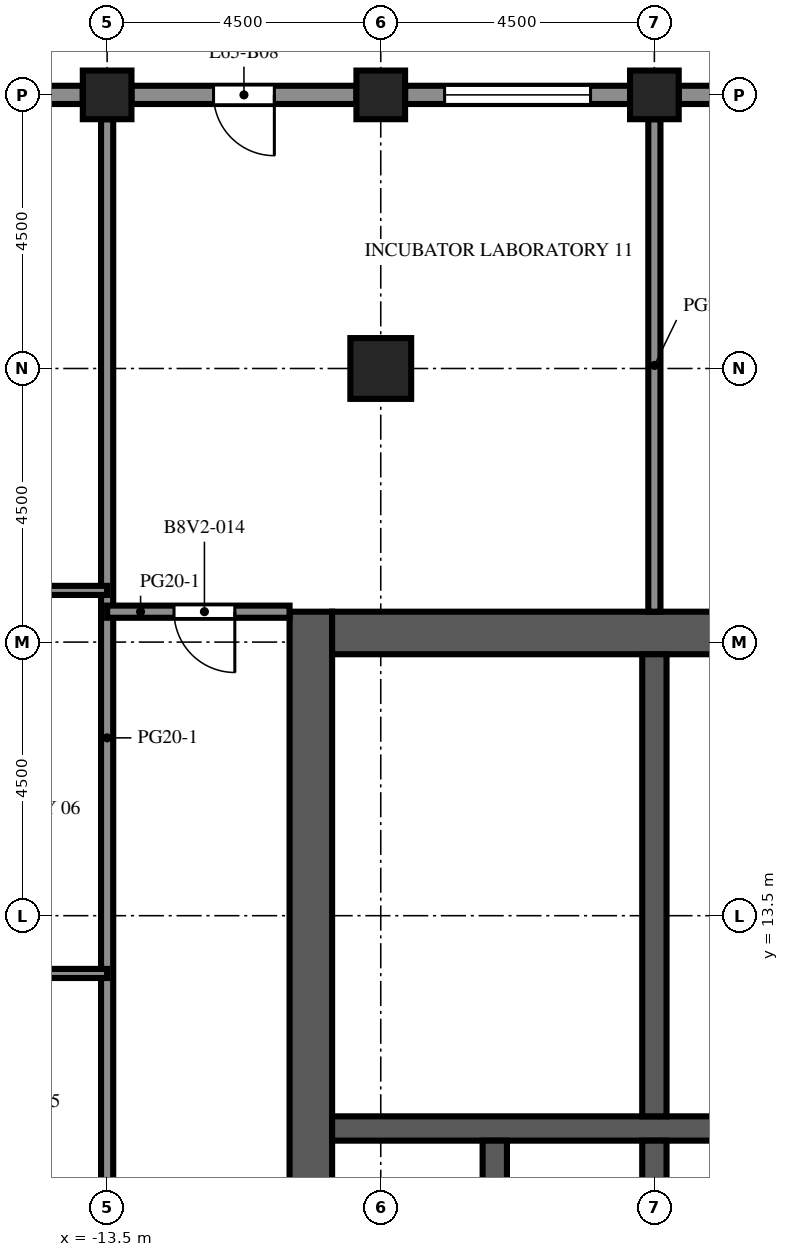
"""IFC4 building model, lengths in metres.
Left out: names, types, materials, properties, quantities, classifications, styles, units other than length and angle.
Written with IfcOpenShell. Run it as: python <this file> out.ifc"""

import sys

from ifc_helpers import new_model, si_unit, direction, frame, frame_2d, origin, origin_2d, place, context, subcontext, project, spatial, rectangle, extrude, element, fill, save


model = new_model("IFC4")
c1 = context("Model", 3, precision=1e-05, world=origin(), true_north=direction((0.0, 1.0)))
c2 = subcontext(c1, "Body", "Model", "MODEL_VIEW")
j1 = project(units=[si_unit("LENGTHUNIT", "METRE"), si_unit("PLANEANGLEUNIT", "RADIAN")], contexts=[c1])
p1 = place(None, origin())
s1 = spatial("IfcSite", under=j1, at=p1, CompositionType="ELEMENT")
p2 = place(p1, origin())
s2 = spatial("IfcBuilding", under=s1, at=p2, CompositionType="ELEMENT")
p3 = place(p2, frame((0.0, 0.0, 286.8)))
s3 = spatial("IfcBuildingStorey", under=s2, at=p3, CompositionType="ELEMENT", Elevation=286.8)
for number, where, z_axis, x_axis in (
    (1, (-13.5, 27.0, 0.0), (0.0, 0.0, 1.0), (1.0, 0.0, 0.0)),
    (2, (-9.0, 27.0, 0.0), (0.0, 0.0, 1.0), (1.0, 0.0, 0.0)),
    (3, (-4.5, 27.0, 0.0), (0.0, 0.0, 1.0), (1.0, 0.0, 0.0)),
):
    element("IfcColumn", number, at=place(p3, frame(where, z_axis=z_axis, x_axis=x_axis)), inside=s3, PredefinedType="COLUMN", context=c2, shape_type="SweptSolid", body=[
        extrude(rectangle(XDim=0.8, YDim=0.8, at=origin_2d()), origin(), (0.0, 0.0, 1.0), 4.1),
    ])
p4 = place(p3, frame((-9.0, 22.5, 0.0), z_axis=(0.0, 0.0, 1.0), x_axis=(1.0, 0.0, 0.0)))
e4 = element("IfcColumn", 4, at=p4, inside=s3, PredefinedType="COLUMN", context=c2, shape_type="SweptSolid", body=[
    extrude(rectangle(XDim=1.0, YDim=1.0, at=origin_2d()), origin(), (0.0, 0.0, 1.0), 4.1),
])
p5 = place(p3, frame((-10.15, -9.0, 0.0), z_axis=(0.0, 0.0, 1.0), x_axis=(0.0, 1.0, 0.0)))
e5 = element("IfcWall", 5, at=p5, inside=s3, PredefinedType="SHEAR", context=c2, shape_type="SweptSolid", body=[
    extrude(rectangle(XDim=27.5, YDim=0.7, at=frame_2d((13.75, 0.0))), origin(), (0.0, 0.0, 1.0), 4.1),
])
p6 = place(p5, frame((12.55, 0.0, 0.0)))
e6 = element("IfcOpeningElement", 6, at=p6, cuts=e5, PredefinedType="OPENING", context=c2, shape_type="SweptSolid", body=[
    extrude(rectangle(XDim=2.4, YDim=2.4, at=frame_2d((1.2, 1.2))), frame((0.0, 0.36, 0.0), z_axis=(0.0, -1.0, 0.0), x_axis=(1.0, 0.0, 0.0)), (0.0, 0.0, 1.0), 0.72),
])
p7 = place(p5, frame((6.825, 0.0, 0.0)))
e7 = element("IfcOpeningElement", 7, at=p7, cuts=e5, PredefinedType="OPENING", context=c2, shape_type="SweptSolid", body=[
    extrude(rectangle(XDim=1.2, YDim=2.1, at=frame_2d((0.6, 1.05))), frame((0.0, 0.36, 0.0), z_axis=(0.0, -1.0, 0.0), x_axis=(1.0, 0.0, 0.0)), (0.0, 0.0, 1.0), 0.72),
])
p8 = place(p5, frame((19.475, 0.0, 0.0)))
e8 = element("IfcOpeningElement", 8, at=p8, cuts=e5, PredefinedType="OPENING", context=c2, shape_type="SweptSolid", body=[
    extrude(rectangle(XDim=1.2, YDim=2.1, at=frame_2d((0.6, 1.05))), frame((0.0, 0.36, 0.0), z_axis=(0.0, -1.0, 0.0), x_axis=(1.0, 0.0, 0.0)), (0.0, 0.0, 1.0), 0.72),
])
p9 = place(p3, frame((-9.8, 18.15, 0.0), z_axis=(0.0, 0.0, 1.0), x_axis=(1.0, 0.0, 0.0)))
e9 = element("IfcWall", 9, at=p9, inside=s3, PredefinedType="SHEAR", context=c2, shape_type="SweptSolid", body=[
    extrude(rectangle(XDim=10.6, YDim=0.7, at=frame_2d((5.3, 0.0))), origin(), (0.0, 0.0, 1.0), 4.1),
])
p10 = place(p3, frame((-9.8, 10.0, 0.0), z_axis=(0.0, 0.0, 1.0), x_axis=(1.0, 0.0, 0.0)))
e10 = element("IfcWall", 10, at=p10, inside=s3, PredefinedType="SHEAR", context=c2, shape_type="SweptSolid", body=[
    extrude(rectangle(XDim=10.6, YDim=0.4, at=frame_2d((5.3, 0.0))), origin(), (0.0, 0.0, 1.0), 4.1),
])
for number, where, z_axis, x_axis in (
    (11, (-7.125, 6.9, 0.0), (0.0, 0.0, 1.0), (0.0, 1.0, 0.0)),
    (12, (-4.5, 6.9, 0.0), (0.0, 0.0, 1.0), (0.0, 1.0, 0.0)),
):
    element("IfcWall", number, at=place(p3, frame(where, z_axis=z_axis, x_axis=x_axis)), inside=s3, PredefinedType="SHEAR", context=c2, shape_type="SweptSolid", body=[
        extrude(rectangle(XDim=2.9, YDim=0.4, at=frame_2d((1.45, 0.0))), origin(), (0.0, 0.0, 1.0), 4.1),
    ])
p11 = place(p3, frame((-4.5, 10.2, 0.0), z_axis=(0.0, 0.0, 1.0), x_axis=(0.0, 1.0, 0.0)))
e13 = element("IfcWall", 13, at=p11, inside=s3, PredefinedType="SHEAR", context=c2, shape_type="SweptSolid", body=[
    extrude(rectangle(XDim=7.6, YDim=0.4, at=frame_2d((3.8, 0.0))), origin(), (0.0, 0.0, 1.0), 4.1),
])
p12 = place(p3, frame((-4.1, 27.0, 0.0), z_axis=(0.0, 0.0, 1.0), x_axis=(1.0, 0.0, 0.0)))
e14 = element("IfcWall", 14, at=p12, inside=s3, PredefinedType="SOLIDWALL", context=c2, shape_type="SweptSolid", body=[
    extrude(rectangle(XDim=3.7, YDim=0.3, at=frame_2d((1.85, 0.0))), origin(), (0.0, 0.0, 1.0), 2.85),
])
p13 = place(p12, frame((0.65, 0.0, 0.8)))
e15 = element("IfcOpeningElement", 15, at=p13, cuts=e14, PredefinedType="OPENING", context=c2, shape_type="SweptSolid", body=[
    extrude(rectangle(XDim=2.4, YDim=1.7, at=frame_2d((1.2, 0.85))), frame((0.0, 0.16, 0.0), z_axis=(0.0, -1.0, 0.0), x_axis=(1.0, 0.0, 0.0)), (0.0, 0.0, 1.0), 0.32),
])
p14 = place(p3, frame((-8.6, 27.0, 0.0), z_axis=(0.0, 0.0, 1.0), x_axis=(1.0, 0.0, 0.0)))
e16 = element("IfcWall", 16, at=p14, inside=s3, PredefinedType="SOLIDWALL", context=c2, shape_type="SweptSolid", body=[
    extrude(rectangle(XDim=3.7, YDim=0.3, at=frame_2d((1.85, 0.0))), origin(), (0.0, 0.0, 1.0), 2.85),
])
p15 = place(p14, frame((0.65, 0.0, 0.8)))
e17 = element("IfcOpeningElement", 17, at=p15, cuts=e16, PredefinedType="OPENING", context=c2, shape_type="SweptSolid", body=[
    extrude(rectangle(XDim=2.4, YDim=1.7, at=frame_2d((1.2, 0.85))), frame((0.0, 0.16, 0.0), z_axis=(0.0, -1.0, 0.0), x_axis=(1.0, 0.0, 0.0)), (0.0, 0.0, 1.0), 0.32),
])
p16 = place(p3, frame((-13.1, 27.0, 0.0), z_axis=(0.0, 0.0, 1.0), x_axis=(1.0, 0.0, 0.0)))
e18 = element("IfcWall", 18, at=p16, inside=s3, PredefinedType="SOLIDWALL", context=c2, shape_type="SweptSolid", body=[
    extrude(rectangle(XDim=3.7, YDim=0.3, at=frame_2d((1.85, 0.0))), origin(), (0.0, 0.0, 1.0), 2.85),
])
p17 = place(p16, frame((1.35, 0.0, 0.0)))
e19 = element("IfcOpeningElement", 19, at=p17, cuts=e18, PredefinedType="OPENING", context=c2, shape_type="SweptSolid", body=[
    extrude(rectangle(XDim=1.0, YDim=2.2, at=frame_2d((0.5, 1.1))), frame((0.0, 0.16, 0.0), z_axis=(0.0, -1.0, 0.0), x_axis=(1.0, 0.0, 0.0)), (0.0, 0.0, 1.0), 0.32),
])
p18 = place(p3, frame((-17.6, 27.0, 0.0), z_axis=(0.0, 0.0, 1.0), x_axis=(1.0, 0.0, 0.0)))
e20 = element("IfcWall", 20, at=p18, inside=s3, PredefinedType="SOLIDWALL", context=c2, shape_type="SweptSolid", body=[
    extrude(rectangle(XDim=3.7, YDim=0.3, at=frame_2d((1.85, 0.0))), origin(), (0.0, 0.0, 1.0), 2.85),
])
p19 = place(p18, frame((0.65, 0.0, 0.8)))
e21 = element("IfcOpeningElement", 21, at=p19, cuts=e20, PredefinedType="OPENING", context=c2, shape_type="SweptSolid", body=[
    extrude(rectangle(XDim=2.4, YDim=1.7, at=frame_2d((1.2, 0.85))), frame((0.0, 0.16, 0.0), z_axis=(0.0, -1.0, 0.0), x_axis=(1.0, 0.0, 0.0)), (0.0, 0.0, 1.0), 0.32),
])
for number, where, z_axis, x_axis in (
    (22, (-4.3, 12.48, 0.0), (0.0, 0.0, 1.0), (1.0, 0.0, 0.0)),
    (23, (-4.3, 14.912, 0.0), (0.0, 0.0, 1.0), (1.0, 0.0, 0.0)),
):
    element("IfcWall", number, at=place(p3, frame(where, z_axis=z_axis, x_axis=x_axis)), inside=s3, PredefinedType="PARTITIONING", context=c2, shape_type="SweptSolid", body=[
        extrude(rectangle(XDim=3.7, YDim=0.1, at=frame_2d((1.85, 0.0))), origin(), (0.0, 0.0, 1.0), 3.65),
    ])
p20 = place(p3, frame((-13.5, 6.25, 0.0), z_axis=(0.0, 0.0, 1.0), x_axis=(0.0, 1.0, 0.0)))
e24 = element("IfcWall", 24, at=p20, inside=s3, PredefinedType="PARTITIONING", context=c2, shape_type="SweptSolid", body=[
    extrude(rectangle(XDim=20.35, YDim=0.2, at=frame_2d((10.175, 0.0))), origin(), (0.0, 0.0, 1.0), 3.65),
])
p21 = place(p3, frame((-4.5, 18.5, 0.0), z_axis=(0.0, 0.0, 1.0), x_axis=(0.0, 1.0, 0.0)))
e25 = element("IfcWall", 25, at=p21, inside=s3, PredefinedType="PARTITIONING", context=c2, shape_type="SweptSolid", body=[
    extrude(rectangle(XDim=8.1, YDim=0.2, at=frame_2d((4.05, 0.0))), origin(), (0.0, 0.0, 1.0), 3.65),
])
p22 = place(p3, frame((-22.35, 12.55, 0.0), z_axis=(0.0, 0.0, 1.0), x_axis=(1.0, 0.0, 0.0)))
e26 = element("IfcWall", 26, at=p22, inside=s3, PredefinedType="PARTITIONING", context=c2, shape_type="SweptSolid", body=[
    extrude(rectangle(XDim=8.85, YDim=0.15, at=frame_2d((4.425, 0.0))), origin(), (0.0, 0.0, 1.0), 3.65),
])
p23 = place(p22, frame((4.2, 0.0, 0.0)))
e27 = element("IfcOpeningElement", 27, at=p23, cuts=e26, PredefinedType="OPENING", context=c2, shape_type="SweptSolid", body=[
    extrude(rectangle(XDim=1.0, YDim=2.1, at=frame_2d((0.5, 1.05))), frame((0.0, 0.085, 0.0), z_axis=(0.0, -1.0, 0.0), x_axis=(1.0, 0.0, 0.0)), (0.0, 0.0, 1.0), 0.17),
])
p24 = place(p3, frame((-13.5, 18.5, 0.0), z_axis=(0.0, 0.0, 1.0), x_axis=(1.0, 0.0, 0.0)))
e28 = element("IfcWall", 28, at=p24, inside=s3, PredefinedType="PARTITIONING", context=c2, shape_type="SweptSolid", body=[
    extrude(rectangle(XDim=3.0, YDim=0.2, at=frame_2d((1.5, 0.0))), origin(), (0.0, 0.0, 1.0), 3.65),
])
p25 = place(p24, frame((1.1, 0.0, 0.0)))
e29 = element("IfcOpeningElement", 29, at=p25, cuts=e28, PredefinedType="OPENING", context=c2, shape_type="SweptSolid", body=[
    extrude(rectangle(XDim=1.0, YDim=2.1, at=frame_2d((0.5, 1.05))), frame((0.0, 0.11, 0.0), z_axis=(0.0, -1.0, 0.0), x_axis=(1.0, 0.0, 0.0)), (0.0, 0.0, 1.0), 0.22),
])
p26 = place(p3, frame((-22.35, 18.85, 0.0), z_axis=(0.0, 0.0, 1.0), x_axis=(1.0, 0.0, 0.0)))
e30 = element("IfcWall", 30, at=p26, inside=s3, PredefinedType="PARTITIONING", context=c2, shape_type="SweptSolid", body=[
    extrude(rectangle(XDim=8.85, YDim=0.15, at=frame_2d((4.425, 0.0))), origin(), (0.0, 0.0, 1.0), 3.65),
])
p27 = place(p26, frame((2.7, 0.0, 0.0)))
e31 = element("IfcOpeningElement", 31, at=p27, cuts=e30, PredefinedType="OPENING", context=c2, shape_type="SweptSolid", body=[
    extrude(rectangle(XDim=1.0, YDim=2.1, at=frame_2d((0.5, 1.05))), frame((0.0, 0.085, 0.0), z_axis=(0.0, -1.0, 0.0), x_axis=(1.0, 0.0, 0.0)), (0.0, 0.0, 1.0), 0.17),
])
p28 = place(p15, origin())
e32 = element("IfcWindow", 32, at=p28, inside=s3, PartitioningType="SINGLE_PANEL", PredefinedType="WINDOW", context=c2, shape_type="SweptSolid", body=[
    extrude(rectangle(XDim=2.4, YDim=1.7, at=frame_2d((1.2, 0.85))), frame((0.0, 0.03, 0.0), z_axis=(0.0, -1.0, 0.0), x_axis=(1.0, 0.0, 0.0)), (0.0, 0.0, 1.0), 0.06),
])
fill(e17, e32)
p29 = place(p17, origin())
e33 = element("IfcDoor", 33, at=p29, inside=s3, OperationType="SINGLE_SWING_RIGHT", PredefinedType="DOOR", context=c2, shape_type="SweptSolid", body=[
    extrude(rectangle(XDim=1.0, YDim=2.2, at=frame_2d((0.5, 1.1))), frame((0.0, 0.025, 0.0), z_axis=(0.0, -1.0, 0.0), x_axis=(1.0, 0.0, 0.0)), (0.0, 0.0, 1.0), 0.05),
])
fill(e19, e33)
p30 = place(p8, origin())
e34 = element("IfcDoor", 34, at=p30, inside=s3, OperationType="SINGLE_SWING_LEFT", PredefinedType="DOOR", context=c2, shape_type="SweptSolid", body=[
    extrude(rectangle(XDim=1.2, YDim=2.1, at=frame_2d((0.6, 1.05))), frame((0.0, 0.025, 0.0), z_axis=(0.0, -1.0, 0.0), x_axis=(1.0, 0.0, 0.0)), (0.0, 0.0, 1.0), 0.05),
])
fill(e8, e34)
p31 = place(p25, origin())
e35 = element("IfcDoor", 35, at=p31, inside=s3, OperationType="SINGLE_SWING_RIGHT", PredefinedType="DOOR", context=c2, shape_type="SweptSolid", body=[
    extrude(rectangle(XDim=1.0, YDim=2.1, at=frame_2d((0.5, 1.05))), frame((0.0, 0.025, 0.0), z_axis=(0.0, -1.0, 0.0), x_axis=(1.0, 0.0, 0.0)), (0.0, 0.0, 1.0), 0.05),
])
fill(e29, e35)
save(model, sys.argv[1])
